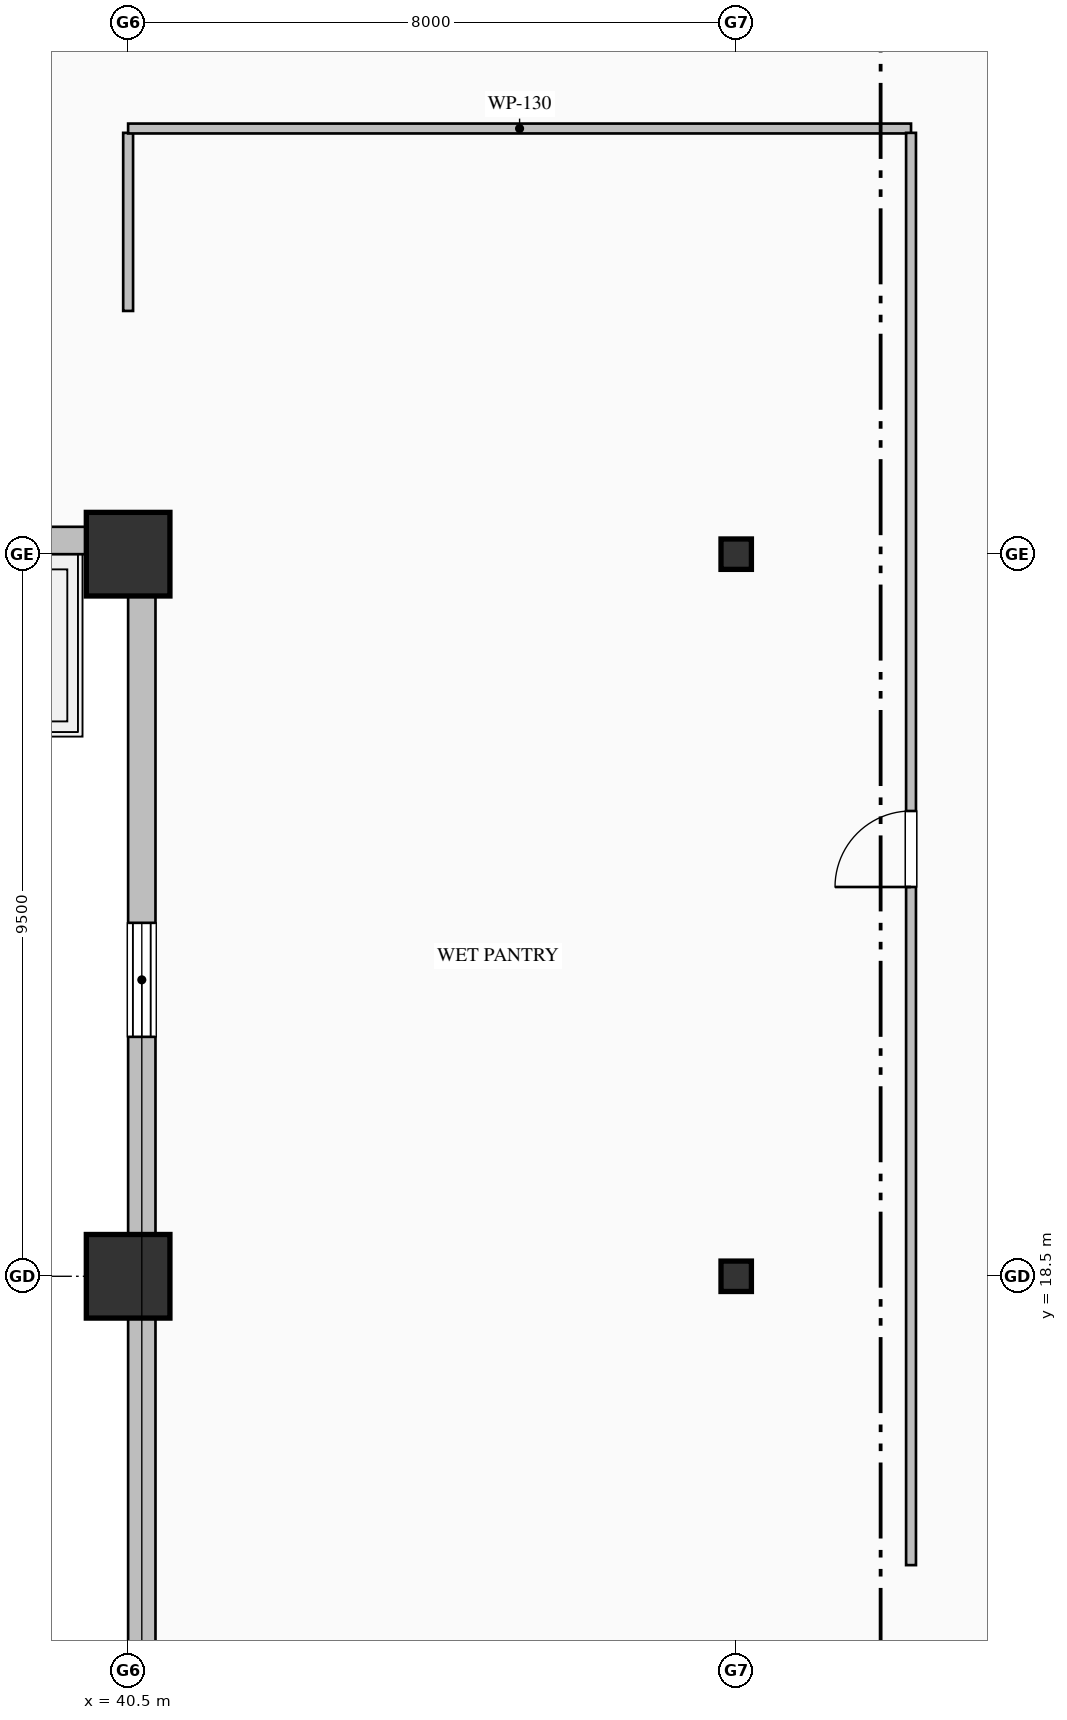
"""IFC4 building model, lengths in metres.
Left out: names, types, materials, properties, quantities, classifications, styles, units other than length and angle.
Written with IfcOpenShell. Run it as: python <this file> out.ifc"""

import sys

from ifc_helpers import new_model, si_unit, direction, frame, frame_2d, origin, origin_2d, place, context, subcontext, project, spatial, rectangle, hollow_rectangle, i_section, extrude, element, fill, save


model = new_model("IFC4")
c1 = context("Model", 3, precision=1e-05, world=origin(), true_north=direction((0.0, 1.0)))
c2 = subcontext(c1, "Body", "Model", "MODEL_VIEW")
j1 = project(units=[si_unit("LENGTHUNIT", "METRE"), si_unit("PLANEANGLEUNIT", "RADIAN")], contexts=[c1])
p1 = place(None, origin())
s1 = spatial("IfcSite", under=j1, at=p1, CompositionType="ELEMENT")
p2 = place(p1, origin())
s2 = spatial("IfcBuilding", under=s1, at=p2, CompositionType="ELEMENT")
p3 = place(p2, frame((0.0, 0.0, 151.0)))
s3 = spatial("IfcBuildingStorey", under=s2, at=p3, CompositionType="ELEMENT", Elevation=151.0)
for number, where, z_axis, x_axis in (
    (1, (40.5, 18.5, 0.0), (0.0, 0.0, 1.0), (1.0, 0.0, 0.0)),
    (2, (40.5, 28.0, 0.0), (0.0, 0.0, 1.0), (1.0, 0.0, 0.0)),
):
    element("IfcColumn", number, at=place(p3, frame(where, z_axis=z_axis, x_axis=x_axis)), inside=s3, PredefinedType="COLUMN", context=c2, shape_type="SweptSolid", body=[
        extrude(hollow_rectangle(XDim=1.1, YDim=1.1, WallThickness=0.04, at=origin_2d()), origin(), (0.0, 0.0, 1.0), 4.0),
    ])
for number, where, z_axis, x_axis in (
    (3, (48.5, 18.5, 0.0), (0.0, 0.0, 1.0), (1.0, 0.0, 0.0)),
    (4, (48.5, 28.0, 0.0), (0.0, 0.0, 1.0), (1.0, 0.0, 0.0)),
):
    element("IfcColumn", number, at=place(p3, frame(where, z_axis=z_axis, x_axis=x_axis)), inside=s3, PredefinedType="COLUMN", context=c2, shape_type="SweptSolid", body=[
        extrude(i_section(OverallWidth=0.4, OverallDepth=0.4, WebThickness=0.013, FlangeThickness=0.021, FilletRadius=0.022, at=origin_2d()), origin(), (0.0, 0.0, 1.0), 4.0),
    ])
p4 = place(p3, frame((40.68, 8.0, 0.0), z_axis=(0.0, 0.0, 1.0), x_axis=(0.0, 1.0, 0.0)))
e5 = element("IfcWall", 5, at=p4, inside=s3, PredefinedType="SOLIDWALL", context=c2, shape_type="SweptSolid", body=[
    extrude(rectangle(XDim=20.36, YDim=0.36, at=frame_2d((10.18, 0.0))), origin(), (0.0, 0.0, 1.0), 3.165),
])
p5 = place(p4, frame((13.65, 0.0, 0.85)))
e6 = element("IfcOpeningElement", 6, at=p5, cuts=e5, PredefinedType="OPENING", context=c2, shape_type="SweptSolid", body=[
    extrude(rectangle(XDim=1.5, YDim=1.95, at=frame_2d((0.75, 0.975))), frame((0.0, 0.19, 0.0), z_axis=(0.0, -1.0, 0.0), x_axis=(1.0, 0.0, 0.0)), (0.0, 0.0, 1.0), 0.38),
])
p6 = place(p3, frame((40.52, 28.18, 0.0), z_axis=(0.0, 0.0, 1.0), x_axis=(-1.0, 0.0, 0.0)))
e7 = element("IfcWall", 7, at=p6, inside=s3, PredefinedType="SOLIDWALL", context=c2, shape_type="SweptSolid", body=[
    extrude(rectangle(XDim=27.52, YDim=0.36, at=frame_2d((13.76, 0.0))), origin(), (0.0, 0.0, 1.0), 3.165),
])
p7 = place(p6, frame((2.775, 0.0, 0.85)))
e8 = element("IfcOpeningElement", 8, at=p7, cuts=e7, PredefinedType="OPENING", context=c2, shape_type="SweptSolid", body=[
    extrude(rectangle(XDim=1.65, YDim=1.95, at=frame_2d((0.825, 0.975))), frame((0.0, 0.19, 0.0), z_axis=(0.0, -1.0, 0.0), x_axis=(1.0, 0.0, 0.0)), (0.0, 0.0, 1.0), 0.38),
])
p8 = place(p6, frame((13.575, 0.0, 0.85)))
e9 = element("IfcOpeningElement", 9, at=p8, cuts=e7, PredefinedType="OPENING", context=c2, shape_type="SweptSolid", body=[
    extrude(rectangle(XDim=1.65, YDim=1.95, at=frame_2d((0.825, 0.975))), frame((0.0, 0.19, 0.0), z_axis=(0.0, -1.0, 0.0), x_axis=(1.0, 0.0, 0.0)), (0.0, 0.0, 1.0), 0.38),
])
p9 = place(p6, frame((17.4, 0.0, 0.7)))
e10 = element("IfcOpeningElement", 10, at=p9, cuts=e7, PredefinedType="OPENING", context=c2, shape_type="SweptSolid", body=[
    extrude(rectangle(XDim=1.2, YDim=1.85, at=frame_2d((0.6, 0.925))), frame((0.0, 0.19, 0.0), z_axis=(0.0, -1.0, 0.0), x_axis=(1.0, 0.0, 0.0)), (0.0, 0.0, 1.0), 0.38),
])
p10 = place(p6, frame((20.85, 0.0, 0.85)))
e11 = element("IfcOpeningElement", 11, at=p10, cuts=e7, PredefinedType="OPENING", context=c2, shape_type="SweptSolid", body=[
    extrude(rectangle(XDim=1.5, YDim=1.95, at=frame_2d((0.75, 0.975))), frame((0.0, 0.19, 0.0), z_axis=(0.0, -1.0, 0.0), x_axis=(1.0, 0.0, 0.0)), (0.0, 0.0, 1.0), 0.38),
])
p11 = place(p6, frame((11.395, 0.0, 0.0)))
e12 = element("IfcOpeningElement", 12, at=p11, cuts=e7, PredefinedType="OPENING", context=c2, shape_type="SweptSolid", body=[
    extrude(rectangle(XDim=1.25, YDim=2.25, at=frame_2d((0.625, 1.125))), frame((0.0, 0.19, 0.0), z_axis=(0.0, -1.0, 0.0), x_axis=(1.0, 0.0, 0.0)), (0.0, 0.0, 1.0), 0.38),
])
p12 = place(p3, frame((40.5, 33.543, 0.0), z_axis=(0.0, 0.0, 1.0), x_axis=(0.0, -1.0, 0.0)))
e13 = element("IfcWall", 13, at=p12, inside=s3, PredefinedType="PARTITIONING", context=c2, shape_type="SweptSolid", body=[
    extrude(rectangle(XDim=2.343, YDim=0.13, at=frame_2d((1.171, 0.0))), origin(), (0.0, 0.0, 1.0), 3.157),
])
p13 = place(p3, frame((50.8, 33.6, 0.0), z_axis=(0.0, 0.0, 1.0), x_axis=(-1.0, 0.0, 0.0)))
e14 = element("IfcWall", 14, at=p13, inside=s3, PredefinedType="PARTITIONING", context=c2, shape_type="SweptSolid", body=[
    extrude(rectangle(XDim=10.3, YDim=0.13, at=frame_2d((5.15, 0.0))), origin(), (0.0, 0.0, 1.0), 3.765),
])
p14 = place(p3, frame((50.8, 14.7, 0.0), z_axis=(0.0, 0.0, 1.0), x_axis=(0.0, 1.0, 0.0)))
e15 = element("IfcWall", 15, at=p14, inside=s3, PredefinedType="PARTITIONING", context=c2, shape_type="SweptSolid", body=[
    extrude(rectangle(XDim=18.843, YDim=0.13, at=frame_2d((9.421, 0.0))), origin(), (0.0, 0.0, 1.0), 3.765),
])
p15 = place(p14, frame((8.921, 0.0, 0.0)))
e16 = element("IfcOpeningElement", 16, at=p15, cuts=e15, PredefinedType="OPENING", context=c2, shape_type="SweptSolid", body=[
    extrude(rectangle(XDim=1.0, YDim=2.15, at=frame_2d((0.5, 1.075))), frame((0.0, 0.075, 0.0), z_axis=(0.0, -1.0, 0.0), x_axis=(1.0, 0.0, 0.0)), (0.0, 0.0, 1.0), 0.15),
])
p16 = place(p5, origin())
e17 = element("IfcWindow", 17, at=p16, inside=s3, PartitioningType="DOUBLE_PANEL_VERTICAL", PredefinedType="WINDOW", context=c2, shape_type="SweptSolid", body=[
    extrude(rectangle(XDim=1.5, YDim=1.95, at=frame_2d((0.75, 0.975))), frame((0.0, 0.15, 0.0), z_axis=(0.0, -1.0, 0.0), x_axis=(1.0, 0.0, 0.0)), (0.0, 0.0, 1.0), 0.06),
])
fill(e6, e17)
p17 = place(p15, origin())
e18 = element("IfcDoor", 18, at=p17, inside=s3, OperationType="SINGLE_SWING_LEFT", PredefinedType="DOOR", context=c2, shape_type="SweptSolid", body=[
    extrude(rectangle(XDim=1.0, YDim=2.15, at=frame_2d((0.5, 1.075))), frame((0.0, 0.025, 0.0), z_axis=(0.0, -1.0, 0.0), x_axis=(1.0, 0.0, 0.0)), (0.0, 0.0, 1.0), 0.05),
])
fill(e16, e18)
save(model, sys.argv[1])
